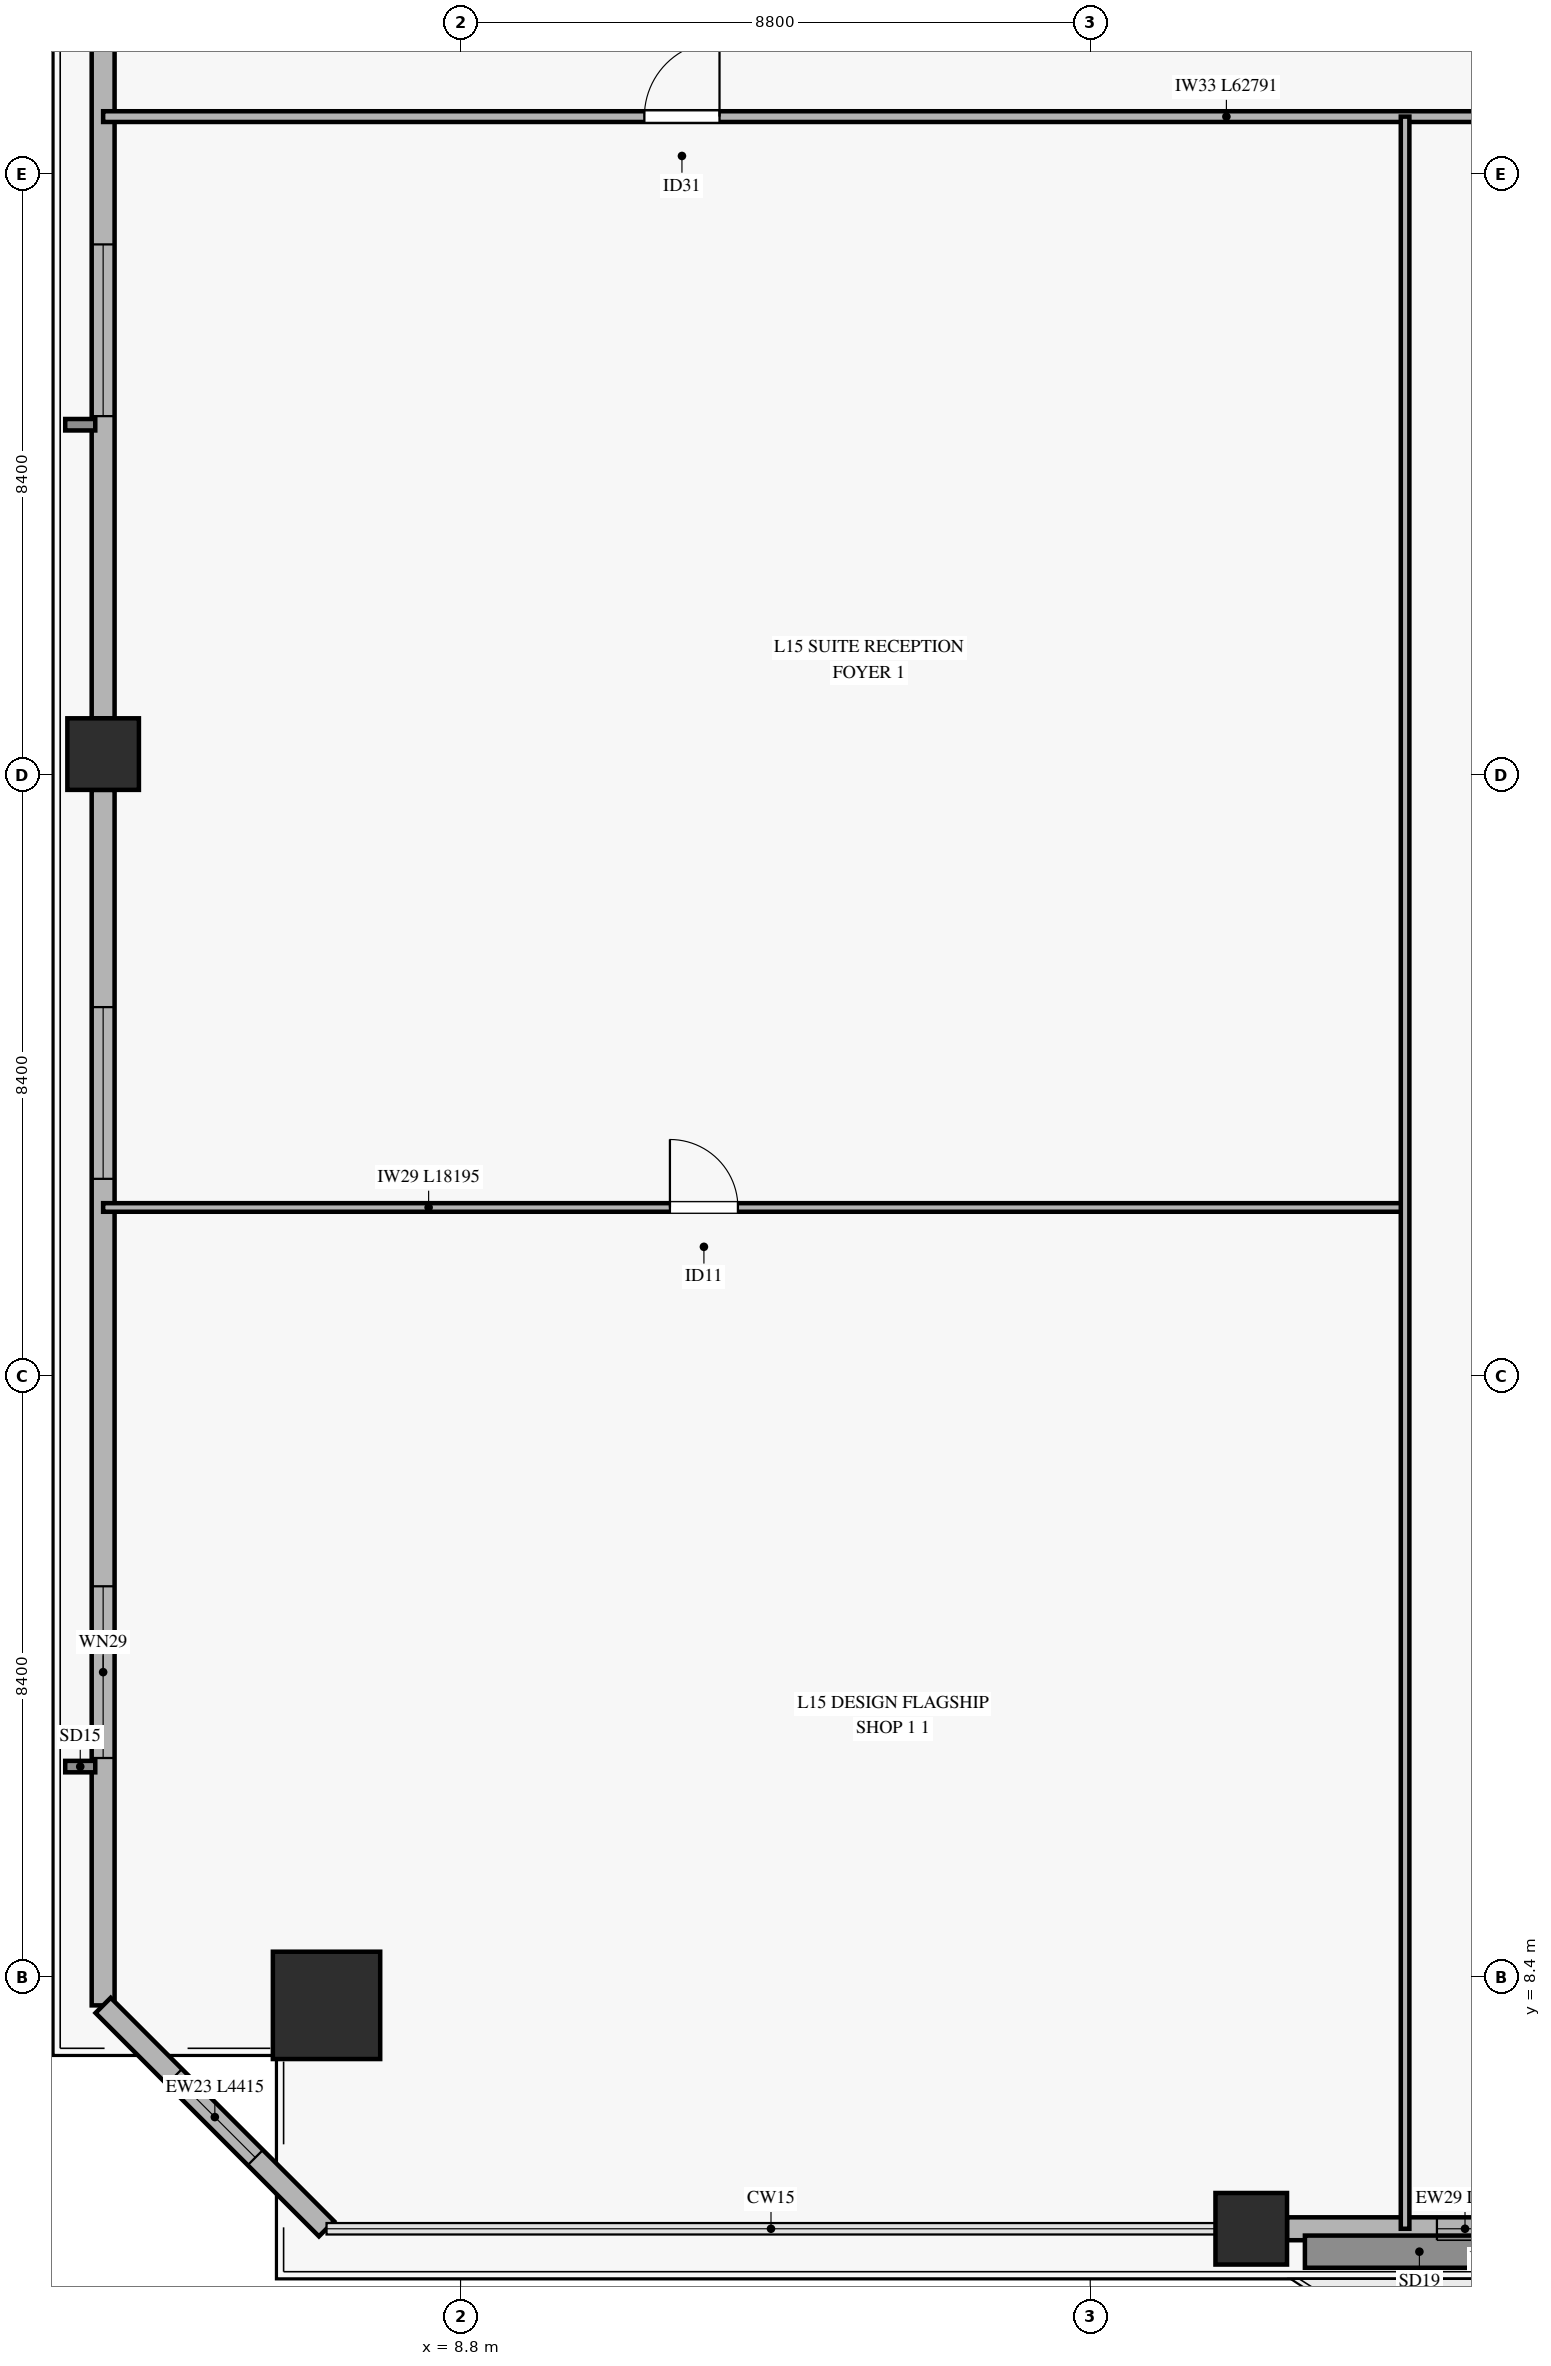
"""IFC4 building model, lengths in metres.
Left out: names, types, materials, properties, quantities, classifications, styles, units other than length and angle.
Written with IfcOpenShell. Run it as: python <this file> out.ifc"""

import sys

from ifc_helpers import new_model, si_unit, direction, frame, frame_2d, origin, origin_2d, place, context, subcontext, project, spatial, rectangle, hollow_rectangle, extrude, source, transform, mapped, element, fill, save


model = new_model("IFC4")
c1 = context("Model", 3, precision=1e-05, world=origin(), true_north=direction((0.0, 1.0)))
c2 = subcontext(c1, "Body", "Model", "MODEL_VIEW")
j1 = project(units=[si_unit("LENGTHUNIT", "METRE"), si_unit("PLANEANGLEUNIT", "RADIAN")], contexts=[c1])
p1 = place(None, origin())
s1 = spatial("IfcSite", under=j1, at=p1, CompositionType="ELEMENT")
p2 = place(p1, origin())
s2 = spatial("IfcBuilding", under=s1, at=p2, CompositionType="ELEMENT")
p3 = place(p2, frame((0.0, 0.0, 61.1)))
s3 = spatial("IfcBuildingStorey", under=s2, at=p3, CompositionType="ELEMENT", Elevation=61.1)
m1 = source(origin(), c2, "Body", "SweptSolid", [
    extrude(hollow_rectangle(XDim=1.5, YDim=1.5, WallThickness=0.07, at=origin_2d()), origin(), (0.0, 0.0, 1.0), 3.68),
])
p4 = place(p3, frame((6.927, 8.004, 0.0), z_axis=(0.0, 0.0, 1.0), x_axis=(1.0, 0.0, 0.0)))
e1 = element("IfcColumn", 1, at=p4, inside=s3, PredefinedType="COLUMN", context=c2, shape_type="MappedRepresentation", body=[
    mapped(m1, transform((0.0, 0.0, 0.0), x_axis=(1.0, 0.0, 0.0), y_axis=(0.0, 1.0, 0.0), z_axis=(0.0, 0.0, 1.0), scale=1.0)),
])
m2 = source(origin(), c2, "Body", "SweptSolid", [
    extrude(hollow_rectangle(XDim=1.0, YDim=1.0, WallThickness=0.045, at=origin_2d()), origin(), (0.0, 0.0, 1.0), 3.68),
])
for number, where, z_axis, x_axis in (
    (2, (19.85, 4.882, 0.0), (0.0, 0.0, 1.0), (1.0, 0.0, 0.0)),
    (3, (3.805, 25.491, 0.0), (0.0, 0.0, 1.0), (1.0, 0.0, 0.0)),
):
    element("IfcColumn", number, at=place(p3, frame(where, z_axis=z_axis, x_axis=x_axis)), inside=s3, PredefinedType="COLUMN", context=c2, shape_type="MappedRepresentation", body=[
        mapped(m2, transform((0.0, 0.0, 0.0), x_axis=(1.0, 0.0, 0.0), y_axis=(0.0, 1.0, 0.0), z_axis=(0.0, 0.0, 1.0), scale=1.0)),
    ])
p5 = place(p3, frame((20.35, 4.882, 0.0), z_axis=(0.0, 0.0, 1.0), x_axis=(1.0, 0.0, 0.0)))
e4 = element("IfcWall", 4, at=p5, inside=s3, PredefinedType="SOLIDWALL", context=c2, shape_type="SweptSolid", body=[
    extrude(rectangle(XDim=9.95, YDim=0.32, at=frame_2d((4.975, 0.0))), origin(), (0.0, 0.0, 1.0), 3.16),
])
p6 = place(p5, frame((4.05, 0.0, 0.0)))
e5 = element("IfcOpeningElement", 5, at=p6, cuts=e4, PredefinedType="OPENING", context=c2, shape_type="SweptSolid", body=[
    extrude(rectangle(XDim=1.8, YDim=2.25, at=frame_2d((0.9, 1.125))), frame((0.0, 0.17, 0.0), z_axis=(0.0, -1.0, 0.0), x_axis=(1.0, 0.0, 0.0)), (0.0, 0.0, 1.0), 0.34),
])
p7 = place(p5, frame((2.095, 0.0, 0.45)))
e6 = element("IfcOpeningElement", 6, at=p7, cuts=e4, PredefinedType="OPENING", context=c2, shape_type="SweptSolid", body=[
    extrude(rectangle(XDim=1.6, YDim=2.0, at=frame_2d((0.8, 1.0))), frame((0.0, 0.17, 0.0), z_axis=(0.0, -1.0, 0.0), x_axis=(1.0, 0.0, 0.0)), (0.0, 0.0, 1.0), 0.34),
])
p8 = place(p5, frame((7.35, 0.0, 0.45)))
e7 = element("IfcOpeningElement", 7, at=p8, cuts=e4, PredefinedType="OPENING", context=c2, shape_type="SweptSolid", body=[
    extrude(rectangle(XDim=1.6, YDim=2.0, at=frame_2d((0.8, 1.0))), frame((0.0, 0.17, 0.0), z_axis=(0.0, -1.0, 0.0), x_axis=(1.0, 0.0, 0.0)), (0.0, 0.0, 1.0), 0.34),
])
p9 = place(p3, frame((3.805, 8.004, 0.0), z_axis=(0.0, 0.0, 1.0), x_axis=(0.0, 1.0, 0.0)))
e8 = element("IfcWall", 8, at=p9, inside=s3, PredefinedType="SOLIDWALL", context=c2, shape_type="SweptSolid", body=[
    extrude(rectangle(XDim=16.987, YDim=0.32, at=frame_2d((8.494, 0.0))), origin(), (0.0, 0.0, 1.0), 3.16),
])
p10 = place(p9, frame((3.457, 0.0, 0.45)))
e9 = element("IfcOpeningElement", 9, at=p10, cuts=e8, PredefinedType="OPENING", context=c2, shape_type="SweptSolid", body=[
    extrude(rectangle(XDim=2.4, YDim=2.1, at=frame_2d((1.2, 1.05))), frame((0.0, 0.17, 0.0), z_axis=(0.0, -1.0, 0.0), x_axis=(1.0, 0.0, 0.0)), (0.0, 0.0, 1.0), 0.34),
])
p11 = place(p9, frame((11.551, 0.0, 0.45)))
e10 = element("IfcOpeningElement", 10, at=p11, cuts=e8, PredefinedType="OPENING", context=c2, shape_type="SweptSolid", body=[
    extrude(rectangle(XDim=2.4, YDim=2.1, at=frame_2d((1.2, 1.05))), frame((0.0, 0.17, 0.0), z_axis=(0.0, -1.0, 0.0), x_axis=(1.0, 0.0, 0.0)), (0.0, 0.0, 1.0), 0.34),
])
p12 = place(p3, frame((3.805, 25.991, 0.0), z_axis=(0.0, 0.0, 1.0), x_axis=(0.0, 1.0, 0.0)))
e11 = element("IfcWall", 11, at=p12, inside=s3, PredefinedType="SOLIDWALL", context=c2, shape_type="SweptSolid", body=[
    extrude(rectangle(XDim=16.987, YDim=0.32, at=frame_2d((8.494, 0.0))), origin(), (0.0, 0.0, 1.0), 3.16),
])
p13 = place(p12, frame((4.223, 0.0, 0.45)))
e12 = element("IfcOpeningElement", 12, at=p13, cuts=e11, PredefinedType="OPENING", context=c2, shape_type="SweptSolid", body=[
    extrude(rectangle(XDim=2.4, YDim=2.1, at=frame_2d((1.2, 1.05))), frame((0.0, 0.17, 0.0), z_axis=(0.0, -1.0, 0.0), x_axis=(1.0, 0.0, 0.0)), (0.0, 0.0, 1.0), 0.34),
])
p14 = place(p3, frame((3.805, 8.004, 0.0), z_axis=(0.0, 0.0, 1.0), x_axis=(0.707134429005, -0.707079132287, 0.0)))
e13 = element("IfcWall", 13, at=p14, inside=s3, PredefinedType="SOLIDWALL", context=c2, shape_type="SweptSolid", body=[
    extrude(rectangle(XDim=4.415, YDim=0.3, at=frame_2d((2.208, 0.0))), origin(), (0.0, 0.0, 1.0), 3.16),
])
p15 = place(p14, frame((1.408, 0.0, 0.45)))
e14 = element("IfcOpeningElement", 14, at=p15, cuts=e13, PredefinedType="OPENING", context=c2, shape_type="SweptSolid", body=[
    extrude(rectangle(XDim=1.6, YDim=2.0, at=frame_2d((0.8, 1.0))), frame((0.0, 0.16, 0.0), z_axis=(0.0, -1.0, 0.0), x_axis=(1.0, 0.0, 0.0)), (0.0, 0.0, 1.0), 0.32),
])
p16 = place(p3, frame((3.805, 34.4, 0.0), z_axis=(0.0, 0.0, 1.0), x_axis=(1.0, 0.0, 0.0)))
e15 = element("IfcWall", 15, at=p16, inside=s3, PredefinedType="PARTITIONING", context=c2, shape_type="SweptSolid", body=[
    extrude(rectangle(XDim=62.791, YDim=0.15, at=frame_2d((31.396, 0.0))), origin(), (0.0, 0.0, 1.0), 2.765),
])
p17 = place(p16, frame((7.564, 0.0, 0.0)))
e16 = element("IfcOpeningElement", 16, at=p17, cuts=e15, PredefinedType="OPENING", context=c2, shape_type="SweptSolid", body=[
    extrude(rectangle(XDim=1.05, YDim=2.15, at=frame_2d((0.525, 1.075))), frame((0.0, 0.085, 0.0), z_axis=(0.0, -1.0, 0.0), x_axis=(1.0, 0.0, 0.0)), (0.0, 0.0, 1.0), 0.17),
])
p18 = place(p16, frame((21.886, 0.0, 0.0)))
e17 = element("IfcOpeningElement", 17, at=p18, cuts=e15, PredefinedType="OPENING", context=c2, shape_type="SweptSolid", body=[
    extrude(rectangle(XDim=1.05, YDim=2.15, at=frame_2d((0.525, 1.075))), frame((0.0, 0.085, 0.0), z_axis=(0.0, -1.0, 0.0), x_axis=(1.0, 0.0, 0.0)), (0.0, 0.0, 1.0), 0.17),
])
p19 = place(p16, frame((30.202, 0.0, 0.0)))
e18 = element("IfcOpeningElement", 18, at=p19, cuts=e15, PredefinedType="OPENING", context=c2, shape_type="SweptSolid", body=[
    extrude(rectangle(XDim=1.05, YDim=2.15, at=frame_2d((0.525, 1.075))), frame((0.0, 0.085, 0.0), z_axis=(0.0, -1.0, 0.0), x_axis=(1.0, 0.0, 0.0)), (0.0, 0.0, 1.0), 0.17),
])
p20 = place(p16, frame((37.73, 0.0, 0.0)))
e19 = element("IfcOpeningElement", 19, at=p20, cuts=e15, PredefinedType="OPENING", context=c2, shape_type="SweptSolid", body=[
    extrude(rectangle(XDim=1.05, YDim=2.15, at=frame_2d((0.525, 1.075))), frame((0.0, 0.085, 0.0), z_axis=(0.0, -1.0, 0.0), x_axis=(1.0, 0.0, 0.0)), (0.0, 0.0, 1.0), 0.17),
])
p21 = place(p16, frame((50.039, 0.0, 0.0)))
e20 = element("IfcOpeningElement", 20, at=p21, cuts=e15, PredefinedType="OPENING", context=c2, shape_type="SweptSolid", body=[
    extrude(rectangle(XDim=1.05, YDim=2.15, at=frame_2d((0.525, 1.075))), frame((0.0, 0.085, 0.0), z_axis=(0.0, -1.0, 0.0), x_axis=(1.0, 0.0, 0.0)), (0.0, 0.0, 1.0), 0.17),
])
p22 = place(p3, frame((3.805, 19.155, 0.0), z_axis=(0.0, 0.0, 1.0), x_axis=(1.0, 0.0, 0.0)))
e21 = element("IfcWall", 21, at=p22, inside=s3, PredefinedType="PARTITIONING", context=c2, shape_type="SweptSolid", body=[
    extrude(rectangle(XDim=18.195, YDim=0.12, at=frame_2d((9.098, 0.0))), origin(), (0.0, 0.0, 1.0), 2.765),
])
p23 = place(p22, frame((7.921, 0.0, 0.0)))
e22 = element("IfcOpeningElement", 22, at=p23, cuts=e21, PredefinedType="OPENING", context=c2, shape_type="SweptSolid", body=[
    extrude(rectangle(XDim=0.95, YDim=2.1, at=frame_2d((0.475, 1.05))), frame((0.0, 0.07, 0.0), z_axis=(0.0, -1.0, 0.0), x_axis=(1.0, 0.0, 0.0)), (0.0, 0.0, 1.0), 0.14),
])
p24 = place(p3, frame((22.0, 4.882, 0.0), z_axis=(0.0, 0.0, 1.0), x_axis=(0.0, 1.0, 0.0)))
e23 = element("IfcWall", 23, at=p24, inside=s3, PredefinedType="PARTITIONING", context=c2, shape_type="SweptSolid", body=[
    extrude(rectangle(XDim=29.518, YDim=0.12, at=frame_2d((14.759, 0.0))), origin(), (0.0, 0.0, 1.0), 3.165),
])
m3 = source(origin(), c2, "Body", "SweptSolid", [
    extrude(rectangle(XDim=1.6, YDim=2.0, at=frame_2d((0.8, 1.0))), frame((0.0, 0.03, 0.0), z_axis=(0.0, -1.0, 0.0), x_axis=(1.0, 0.0, 0.0)), (0.0, 0.0, 1.0), 0.06),
])
p25 = place(p7, origin())
e24 = element("IfcWindow", 24, at=p25, inside=s3, PartitioningType="SINGLE_PANEL", PredefinedType="WINDOW", context=c2, shape_type="MappedRepresentation", body=[
    mapped(m3, transform((0.0, 0.0, 0.0), x_axis=(1.0, 0.0, 0.0), y_axis=(0.0, 1.0, 0.0), z_axis=(0.0, 0.0, 1.0), scale=1.0)),
])
fill(e6, e24)
m4 = source(origin(), c2, "Body", "SweptSolid", [
    extrude(rectangle(XDim=2.4, YDim=2.1, at=frame_2d((1.2, 1.05))), frame((0.0, 0.03, 0.0), z_axis=(0.0, -1.0, 0.0), x_axis=(1.0, 0.0, 0.0)), (0.0, 0.0, 1.0), 0.06),
])
p26 = place(p10, origin())
e25 = element("IfcWindow", 25, at=p26, inside=s3, PartitioningType="SINGLE_PANEL", PredefinedType="WINDOW", context=c2, shape_type="MappedRepresentation", body=[
    mapped(m4, transform((0.0, 0.0, 0.0), x_axis=(1.0, 0.0, 0.0), y_axis=(0.0, 1.0, 0.0), z_axis=(0.0, 0.0, 1.0), scale=1.0)),
])
fill(e9, e25)
p27 = place(p11, origin())
e26 = element("IfcWindow", 26, at=p27, inside=s3, PartitioningType="SINGLE_PANEL", PredefinedType="WINDOW", context=c2, shape_type="MappedRepresentation", body=[
    mapped(m4, transform((0.0, 0.0, 0.0), x_axis=(1.0, 0.0, 0.0), y_axis=(0.0, 1.0, 0.0), z_axis=(0.0, 0.0, 1.0), scale=1.0)),
])
fill(e10, e26)
p28 = place(p13, origin())
e27 = element("IfcWindow", 27, at=p28, inside=s3, PartitioningType="SINGLE_PANEL", PredefinedType="WINDOW", context=c2, shape_type="MappedRepresentation", body=[
    mapped(m4, transform((0.0, 0.0, 0.0), x_axis=(1.0, 0.0, 0.0), y_axis=(0.0, 1.0, 0.0), z_axis=(0.0, 0.0, 1.0), scale=1.0)),
])
fill(e12, e27)
p29 = place(p15, origin())
e28 = element("IfcWindow", 28, at=p29, inside=s3, PartitioningType="SINGLE_PANEL", PredefinedType="WINDOW", context=c2, shape_type="MappedRepresentation", body=[
    mapped(m3, transform((0.0, 0.0, 0.0), x_axis=(1.0, 0.0, 0.0), y_axis=(0.0, 1.0, 0.0), z_axis=(0.0, 0.0, 1.0), scale=1.0)),
])
fill(e14, e28)
m5 = source(origin(), c2, "Body", "SweptSolid", [
    extrude(rectangle(XDim=1.05, YDim=2.15, at=frame_2d((0.525, 1.075))), frame((0.0, 0.025, 0.0), z_axis=(0.0, -1.0, 0.0), x_axis=(1.0, 0.0, 0.0)), (0.0, 0.0, 1.0), 0.05),
])
p30 = place(p17, origin())
e29 = element("IfcDoor", 29, at=p30, inside=s3, OperationType="SINGLE_SWING_RIGHT", PredefinedType="DOOR", context=c2, shape_type="MappedRepresentation", body=[
    mapped(m5, transform((0.0, 0.0, 0.0), x_axis=(1.0, 0.0, 0.0), y_axis=(0.0, 1.0, 0.0), z_axis=(0.0, 0.0, 1.0), scale=1.0)),
])
fill(e16, e29)
m6 = source(origin(), c2, "Body", "SweptSolid", [
    extrude(rectangle(XDim=0.95, YDim=2.1, at=frame_2d((0.475, 1.05))), frame((0.0, 0.025, 0.0), z_axis=(0.0, -1.0, 0.0), x_axis=(1.0, 0.0, 0.0)), (0.0, 0.0, 1.0), 0.05),
])
p31 = place(p23, origin())
e30 = element("IfcDoor", 30, at=p31, inside=s3, OperationType="SINGLE_SWING_LEFT", PredefinedType="DOOR", context=c2, shape_type="MappedRepresentation", body=[
    mapped(m6, transform((0.0, 0.0, 0.0), x_axis=(1.0, 0.0, 0.0), y_axis=(0.0, 1.0, 0.0), z_axis=(0.0, 0.0, 1.0), scale=1.0)),
])
fill(e22, e30)
save(model, sys.argv[1])
